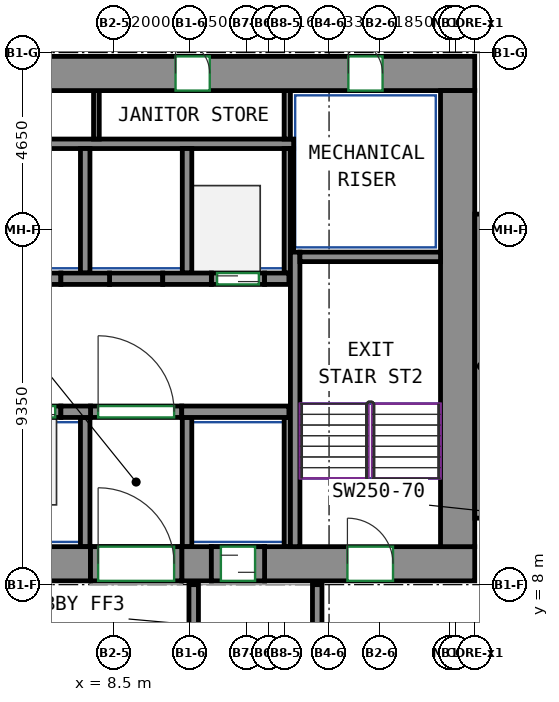
"""IFC4 building model, lengths in metres.
Left out: names, types, materials, properties, quantities, classifications, styles, units other than length and angle.
Written with IfcOpenShell. Run it as: python <this file> out.ifc"""

import sys

from ifc_helpers import new_model, si_unit, direction, frame, frame_2d, origin, place, context, subcontext, project, spatial, rectangle, extrude, source, transform, mapped, element, fill, save


model = new_model("IFC4")
c1 = context("Model", 3, precision=1e-05, world=origin(), true_north=direction((0.0, 1.0)))
c2 = subcontext(c1, "Body", "Model", "MODEL_VIEW")
j1 = project(units=[si_unit("LENGTHUNIT", "METRE"), si_unit("PLANEANGLEUNIT", "RADIAN")], contexts=[c1])
p1 = place(None, origin())
s1 = spatial("IfcSite", under=j1, at=p1, CompositionType="ELEMENT")
p2 = place(p1, origin())
s2 = spatial("IfcBuilding", under=s1, at=p2, CompositionType="ELEMENT")
p3 = place(p2, frame((0.0, 0.0, 138.5)))
s3 = spatial("IfcBuildingStorey", under=s2, at=p3, CompositionType="ELEMENT", Elevation=138.5)
m1 = source(origin(), c2, "Body", "SweptSolid", [
    extrude(rectangle(XDim=14.18, YDim=0.9, at=frame_2d((7.09, 0.0))), origin(), (0.0, 0.0, 1.0), 5.12),
])
p4 = place(p3, frame((-6.29, 8.55, 0.0), z_axis=(0.0, 0.0, 1.0), x_axis=(1.0, 0.0, 0.0)))
e1 = element("IfcWall", 1, at=p4, inside=s3, PredefinedType="SHEAR", context=c2, shape_type="MappedRepresentation", body=[
    mapped(m1, transform((0.0, 0.0, 0.0))),
])
m2 = source(origin(), c2, "Body", "SweptSolid", [
    extrude(rectangle(XDim=0.78, YDim=0.9, at=frame_2d((0.39, 0.0))), origin(), (0.0, 0.0, 1.0), 5.12),
])
p5 = place(p3, frame((10.29, 8.55, 0.0), z_axis=(0.0, 0.0, 1.0), x_axis=(1.0, 0.0, 0.0)))
e2 = element("IfcWall", 2, at=p5, inside=s3, PredefinedType="SHEAR", context=c2, shape_type="MappedRepresentation", body=[
    mapped(m2, transform((0.0, 0.0, 0.0))),
])
m3 = source(origin(), c2, "Body", "SweptSolid", [
    extrude(rectangle(XDim=5.53, YDim=0.9, at=frame_2d((2.765, 0.0))), origin(), (0.0, 0.0, 1.0), 5.12),
])
p6 = place(p3, frame((12.47, 8.55, 0.0), z_axis=(0.0, 0.0, 1.0), x_axis=(1.0, 0.0, 0.0)))
e3 = element("IfcWall", 3, at=p6, inside=s3, PredefinedType="SHEAR", context=c2, shape_type="MappedRepresentation", body=[
    mapped(m3, transform((0.0, 0.0, 0.0))),
])
p7 = place(p6, frame((2.18, 0.0, 0.0)))
e4 = element("IfcOpeningElement", 4, at=p7, cuts=e3, PredefinedType="OPENING", context=c2, shape_type="SweptSolid", body=[
    extrude(rectangle(XDim=1.2, YDim=2.1, at=frame_2d((0.6, 1.05))), frame((0.0, 0.46, 0.0), z_axis=(0.0, -1.0, 0.0), x_axis=(1.0, 0.0, 0.0)), (0.0, 0.0, 1.0), 0.92),
])
m4 = source(origin(), c2, "Body", "SweptSolid", [
    extrude(rectangle(XDim=33.9, YDim=0.9, at=frame_2d((16.95, 0.0))), origin(), (0.0, 0.0, 1.0), 5.12),
])
p8 = place(p3, frame((-15.9, 21.45, 0.0), z_axis=(0.0, 0.0, 1.0), x_axis=(1.0, 0.0, 0.0)))
e5 = element("IfcWall", 5, at=p8, inside=s3, PredefinedType="SHEAR", context=c2, shape_type="MappedRepresentation", body=[
    mapped(m4, transform((0.0, 0.0, 0.0))),
])
p9 = place(p8, frame((7.12, 0.0, 0.0)))
e6 = element("IfcOpeningElement", 6, at=p9, cuts=e5, PredefinedType="OPENING", context=c2, shape_type="SweptSolid", body=[
    extrude(rectangle(XDim=0.9, YDim=2.1, at=frame_2d((0.45, 1.05))), frame((0.0, 0.46, 0.0), z_axis=(0.0, -1.0, 0.0), x_axis=(1.0, 0.0, 0.0)), (0.0, 0.0, 1.0), 0.92),
])
p10 = place(p8, frame((12.427, 0.0, 0.0)))
e7 = element("IfcOpeningElement", 7, at=p10, cuts=e5, PredefinedType="OPENING", context=c2, shape_type="SweptSolid", body=[
    extrude(rectangle(XDim=0.9, YDim=2.1, at=frame_2d((0.45, 1.05))), frame((0.0, 0.46, 0.0), z_axis=(0.0, -1.0, 0.0), x_axis=(1.0, 0.0, 0.0)), (0.0, 0.0, 1.0), 0.92),
])
p11 = place(p8, frame((17.465, 0.0, 0.0)))
e8 = element("IfcOpeningElement", 8, at=p11, cuts=e5, PredefinedType="OPENING", context=c2, shape_type="SweptSolid", body=[
    extrude(rectangle(XDim=0.9, YDim=2.1, at=frame_2d((0.45, 1.05))), frame((0.0, 0.46, 0.0), z_axis=(0.0, -1.0, 0.0), x_axis=(1.0, 0.0, 0.0)), (0.0, 0.0, 1.0), 0.92),
])
p12 = place(p8, frame((21.686, 0.0, 0.0)))
e9 = element("IfcOpeningElement", 9, at=p12, cuts=e5, PredefinedType="OPENING", context=c2, shape_type="SweptSolid", body=[
    extrude(rectangle(XDim=0.9, YDim=2.1, at=frame_2d((0.45, 1.05))), frame((0.0, 0.46, 0.0), z_axis=(0.0, -1.0, 0.0), x_axis=(1.0, 0.0, 0.0)), (0.0, 0.0, 1.0), 0.92),
])
p13 = place(p8, frame((26.027, 0.0, 0.0)))
e10 = element("IfcOpeningElement", 10, at=p13, cuts=e5, PredefinedType="OPENING", context=c2, shape_type="SweptSolid", body=[
    extrude(rectangle(XDim=0.9, YDim=2.1, at=frame_2d((0.45, 1.05))), frame((0.0, 0.46, 0.0), z_axis=(0.0, -1.0, 0.0), x_axis=(1.0, 0.0, 0.0)), (0.0, 0.0, 1.0), 0.92),
])
p14 = place(p8, frame((2.425, 0.0, 0.0)))
e11 = element("IfcOpeningElement", 11, at=p14, cuts=e5, PredefinedType="OPENING", context=c2, shape_type="SweptSolid", body=[
    extrude(rectangle(XDim=0.9, YDim=2.1, at=frame_2d((0.45, 1.05))), frame((0.0, 0.46, 0.0), z_axis=(0.0, -1.0, 0.0), x_axis=(1.0, 0.0, 0.0)), (0.0, 0.0, 1.0), 0.92),
])
p15 = place(p8, frame((30.575, 0.0, 0.0)))
e12 = element("IfcOpeningElement", 12, at=p15, cuts=e5, PredefinedType="OPENING", context=c2, shape_type="SweptSolid", body=[
    extrude(rectangle(XDim=0.9, YDim=2.1, at=frame_2d((0.45, 1.05))), frame((0.0, 0.46, 0.0), z_axis=(0.0, -1.0, 0.0), x_axis=(1.0, 0.0, 0.0)), (0.0, 0.0, 1.0), 0.92),
])
m5 = source(origin(), c2, "Body", "SweptSolid", [
    extrude(rectangle(XDim=12.0, YDim=0.9, at=frame_2d((6.0, 0.0))), origin(), (0.0, 0.0, 1.0), 5.12),
])
p16 = place(p3, frame((17.55, 9.0, 0.0), z_axis=(0.0, 0.0, 1.0), x_axis=(0.0, 1.0, 0.0)))
e13 = element("IfcWall", 13, at=p16, inside=s3, PredefinedType="SHEAR", context=c2, shape_type="MappedRepresentation", body=[
    mapped(m5, transform((0.0, 0.0, 0.0))),
])
m6 = source(origin(), c2, "Body", "SweptSolid", [
    extrude(rectangle(XDim=7.75, YDim=0.25, at=frame_2d((3.875, 0.0))), origin(), (0.0, 0.0, 1.0), 5.12),
])
p17 = place(p3, frame((13.275, 9.0, 0.0), z_axis=(0.0, 0.0, 1.0), x_axis=(0.0, 1.0, 0.0)))
e14 = element("IfcWall", 14, at=p17, inside=s3, PredefinedType="SHEAR", context=c2, shape_type="MappedRepresentation", body=[
    mapped(m6, transform((0.0, 0.0, 0.0))),
])
m7 = source(origin(), c2, "Body", "SweptSolid", [
    extrude(rectangle(XDim=3.7, YDim=0.25, at=frame_2d((1.85, 0.0))), origin(), (0.0, 0.0, 1.0), 5.12),
])
p18 = place(p3, frame((13.4, 16.625, 0.0), z_axis=(0.0, 0.0, 1.0), x_axis=(1.0, 0.0, 0.0)))
e15 = element("IfcWall", 15, at=p18, inside=s3, PredefinedType="SHEAR", context=c2, shape_type="MappedRepresentation", body=[
    mapped(m7, transform((0.0, 0.0, 0.0))),
])
m8 = source(origin(), c2, "Body", "SweptSolid", [
    extrude(rectangle(XDim=8.0, YDim=0.35, at=frame_2d((4.0, 0.0))), origin(), (0.0, 0.0, 1.0), 5.12),
])
p19 = place(p3, frame((18.175, 9.75, 0.0), z_axis=(0.0, 0.0, 1.0), x_axis=(0.0, 1.0, 0.0)))
e16 = element("IfcWall", 16, at=p19, inside=s3, PredefinedType="SHEAR", context=c2, shape_type="MappedRepresentation", body=[
    mapped(m8, transform((0.0, 0.0, 0.0))),
])
m9 = source(origin(), c2, "Body", "SweptSolid", [
    extrude(rectangle(XDim=0.78, YDim=0.3, at=frame_2d((0.39, 0.0))), origin(), (0.0, 0.0, 1.0), 5.12),
])
p20 = place(p3, frame((7.11, 12.55, 0.0), z_axis=(0.0, 0.0, 1.0), x_axis=(1.0, 0.0, 0.0)))
e17 = element("IfcWall", 17, at=p20, inside=s3, PredefinedType="SHEAR", context=c2, shape_type="MappedRepresentation", body=[
    mapped(m9, transform((0.0, 0.0, 0.0))),
])
m10 = source(origin(), c2, "Body", "SweptSolid", [
    extrude(rectangle(XDim=2.82, YDim=0.3, at=frame_2d((1.41, 0.0))), origin(), (0.0, 0.0, 1.0), 5.12),
])
p21 = place(p3, frame((10.29, 12.55, 0.0), z_axis=(0.0, 0.0, 1.0), x_axis=(1.0, 0.0, 0.0)))
e18 = element("IfcWall", 18, at=p21, inside=s3, PredefinedType="SHEAR", context=c2, shape_type="MappedRepresentation", body=[
    mapped(m10, transform((0.0, 0.0, 0.0))),
])
m11 = source(origin(), c2, "Body", "SweptSolid", [
    extrude(rectangle(XDim=1.28, YDim=0.3, at=frame_2d((0.64, 0.0))), origin(), (0.0, 0.0, 1.0), 5.12),
])
p22 = place(p3, frame((7.11, 16.05, 0.0), z_axis=(0.0, 0.0, 1.0), x_axis=(1.0, 0.0, 0.0)))
e19 = element("IfcWall", 19, at=p22, inside=s3, PredefinedType="SHEAR", context=c2, shape_type="MappedRepresentation", body=[
    mapped(m11, transform((0.0, 0.0, 0.0))),
])
m12 = source(origin(), c2, "Body", "SweptSolid", [
    extrude(rectangle(XDim=1.28, YDim=0.3, at=frame_2d((0.64, 0.0))), origin(), (0.0, 0.0, 1.0), 5.12),
])
p23 = place(p3, frame((9.79, 16.05, 0.0), z_axis=(0.0, 0.0, 1.0), x_axis=(1.0, 0.0, 0.0)))
e20 = element("IfcWall", 20, at=p23, inside=s3, PredefinedType="SHEAR", context=c2, shape_type="MappedRepresentation", body=[
    mapped(m12, transform((0.0, 0.0, 0.0))),
])
m13 = source(origin(), c2, "Body", "SweptSolid", [
    extrude(rectangle(XDim=0.64, YDim=0.3, at=frame_2d((0.32, 0.0))), origin(), (0.0, 0.0, 1.0), 5.12),
])
p24 = place(p3, frame((12.47, 16.05, 0.0), z_axis=(0.0, 0.0, 1.0), x_axis=(1.0, 0.0, 0.0)))
e21 = element("IfcWall", 21, at=p24, inside=s3, PredefinedType="SHEAR", context=c2, shape_type="MappedRepresentation", body=[
    mapped(m13, transform((0.0, 0.0, 0.0))),
])
m14 = source(origin(), c2, "Body", "SweptSolid", [
    extrude(rectangle(XDim=2.4, YDim=0.9, at=frame_2d((1.2, 0.0))), origin(), (0.0, 0.0, 1.0), 0.92),
])
p25 = place(p3, frame((7.89, 8.55, 4.2), z_axis=(0.0, 0.0, 1.0), x_axis=(1.0, 0.0, 0.0)))
e22 = element("IfcWall", 22, at=p25, inside=s3, PredefinedType="SHEAR", context=c2, shape_type="MappedRepresentation", body=[
    mapped(m14, transform((0.0, 0.0, 0.0))),
])
m15 = source(origin(), c2, "Body", "SweptSolid", [
    extrude(rectangle(XDim=1.4, YDim=0.9, at=frame_2d((0.7, 0.0))), origin(), (0.0, 0.0, 1.0), 1.17),
])
p26 = place(p3, frame((11.07, 8.55, 3.95), z_axis=(0.0, 0.0, 1.0), x_axis=(1.0, 0.0, 0.0)))
e23 = element("IfcWall", 23, at=p26, inside=s3, PredefinedType="SHEAR", context=c2, shape_type="MappedRepresentation", body=[
    mapped(m15, transform((0.0, 0.0, 0.0))),
])
m16 = source(origin(), c2, "Body", "SweptSolid", [
    extrude(rectangle(XDim=1.4, YDim=0.3, at=frame_2d((0.7, 0.0))), origin(), (0.0, 0.0, 1.0), 5.12),
])
p27 = place(p3, frame((5.71, 12.55, 0.0), z_axis=(0.0, 0.0, 1.0), x_axis=(1.0, 0.0, 0.0)))
e24 = element("IfcWall", 24, at=p27, inside=s3, PredefinedType="PARTITIONING", context=c2, shape_type="MappedRepresentation", body=[
    mapped(m16, transform((0.0, 0.0, 0.0))),
])
p28 = place(p27, frame((0.15, 0.0, 0.0)))
e25 = element("IfcOpeningElement", 25, at=p28, cuts=e24, PredefinedType="OPENING", context=c2, shape_type="SweptSolid", body=[
    extrude(rectangle(XDim=1.1, YDim=2.1, at=frame_2d((0.55, 1.05))), frame((0.0, 0.16, 0.0), z_axis=(0.0, -1.0, 0.0), x_axis=(1.0, 0.0, 0.0)), (0.0, 0.0, 1.0), 0.32),
])
m17 = source(origin(), c2, "Body", "SweptSolid", [
    extrude(rectangle(XDim=1.4, YDim=0.3, at=frame_2d((0.7, 0.0))), origin(), (0.0, 0.0, 1.0), 5.12),
])
p29 = place(p3, frame((11.07, 16.05, 0.0), z_axis=(0.0, 0.0, 1.0), x_axis=(1.0, 0.0, 0.0)))
e26 = element("IfcWall", 26, at=p29, inside=s3, PredefinedType="PARTITIONING", context=c2, shape_type="MappedRepresentation", body=[
    mapped(m17, transform((0.0, 0.0, 0.0))),
])
p30 = place(p29, frame((0.15, 0.0, 0.0)))
e27 = element("IfcOpeningElement", 27, at=p30, cuts=e26, PredefinedType="OPENING", context=c2, shape_type="SweptSolid", body=[
    extrude(rectangle(XDim=1.1, YDim=2.1, at=frame_2d((0.55, 1.05))), frame((0.0, 0.16, 0.0), z_axis=(0.0, -1.0, 0.0), x_axis=(1.0, 0.0, 0.0)), (0.0, 0.0, 1.0), 0.32),
])
m18 = source(origin(), c2, "Body", "SweptSolid", [
    extrude(rectangle(XDim=2.4, YDim=0.3, at=frame_2d((1.2, 0.0))), origin(), (0.0, 0.0, 1.0), 5.12),
])
p31 = place(p3, frame((7.89, 12.55, 0.0), z_axis=(0.0, 0.0, 1.0), x_axis=(1.0, 0.0, 0.0)))
e28 = element("IfcWall", 28, at=p31, inside=s3, PredefinedType="PARTITIONING", context=c2, shape_type="MappedRepresentation", body=[
    mapped(m18, transform((0.0, 0.0, 0.0))),
])
p32 = place(p31, frame((0.2, 0.0, 0.0)))
e29 = element("IfcOpeningElement", 29, at=p32, cuts=e28, PredefinedType="OPENING", context=c2, shape_type="SweptSolid", body=[
    extrude(rectangle(XDim=2.0, YDim=2.1, at=frame_2d((1.0, 1.05))), frame((0.0, 0.16, 0.0), z_axis=(0.0, -1.0, 0.0), x_axis=(1.0, 0.0, 0.0)), (0.0, 0.0, 1.0), 0.32),
])
for number, where, z_axis, x_axis in (
    (30, (5.71, 16.05, 0.0), (0.0, 0.0, 1.0), (1.0, 0.0, 0.0)),
    (31, (8.39, 16.05, 0.0), (0.0, 0.0, 1.0), (1.0, 0.0, 0.0)),
):
    element("IfcWall", number, at=place(p3, frame(where, z_axis=z_axis, x_axis=x_axis)), inside=s3, PredefinedType="PARTITIONING", context=c2, shape_type="MappedRepresentation", body=[
        mapped(m16, transform((0.0, 0.0, 0.0))),
    ])
m19 = source(origin(), c2, "Body", "SweptSolid", [
    extrude(rectangle(XDim=2.65, YDim=0.25, at=frame_2d((1.325, 0.0))), origin(), (0.0, 0.0, 1.0), 5.12),
])
for number, where, z_axis, x_axis in (
    (32, (10.605, 5.35, 0.0), (0.0, 0.0, 1.0), (0.0, 1.0, 0.0)),
    (33, (13.855, 5.35, 0.0), (0.0, 0.0, 1.0), (0.0, 1.0, 0.0)),
):
    element("IfcWall", number, at=place(p3, frame(where, z_axis=z_axis, x_axis=x_axis)), inside=s3, PredefinedType="PARTITIONING", context=c2, shape_type="MappedRepresentation", body=[
        mapped(m19, transform((0.0, 0.0, 0.0))),
    ])
m20 = source(origin(), c2, "Body", "SweptSolid", [
    extrude(rectangle(XDim=19.01, YDim=0.25, at=frame_2d((9.505, 0.0))), origin(), (0.0, 0.0, 1.0), 5.12),
])
p33 = place(p3, frame((-5.775, 19.6, 0.0), z_axis=(0.0, 0.0, 1.0), x_axis=(1.0, 0.0, 0.0)))
e34 = element("IfcWall", 34, at=p33, inside=s3, PredefinedType="PARTITIONING", context=c2, shape_type="MappedRepresentation", body=[
    mapped(m20, transform((0.0, 0.0, 0.0))),
])
m21 = source(origin(), c2, "Body", "SweptSolid", [
    extrude(rectangle(XDim=3.275, YDim=0.165, at=frame_2d((1.638, 0.0))), origin(), (0.0, 0.0, 1.0), 5.12),
])
p34 = place(p3, frame((13.067, 16.2, 0.0), z_axis=(0.0, 0.0, 1.0), x_axis=(0.0, 1.0, 0.0)))
e35 = element("IfcWall", 35, at=p34, inside=s3, PredefinedType="PARTITIONING", context=c2, shape_type="MappedRepresentation", body=[
    mapped(m21, transform((0.0, 0.0, 0.0))),
])
m22 = source(origin(), c2, "Body", "SweptSolid", [
    extrude(rectangle(XDim=1.275, YDim=0.165, at=frame_2d((0.637, 0.0))), origin(), (0.0, 0.0, 1.0), 5.12),
])
p35 = place(p3, frame((13.067, 19.725, 0.0), z_axis=(0.0, 0.0, 1.0), x_axis=(0.0, 1.0, 0.0)))
e36 = element("IfcWall", 36, at=p35, inside=s3, PredefinedType="PARTITIONING", context=c2, shape_type="MappedRepresentation", body=[
    mapped(m22, transform((0.0, 0.0, 0.0))),
])
m23 = source(origin(), c2, "Body", "SweptSolid", [
    extrude(rectangle(XDim=3.275, YDim=0.25, at=frame_2d((1.638, 0.0))), origin(), (0.0, 0.0, 1.0), 5.12),
])
p36 = place(p3, frame((10.43, 16.2, 0.0), z_axis=(0.0, 0.0, 1.0), x_axis=(0.0, 1.0, 0.0)))
e37 = element("IfcWall", 37, at=p36, inside=s3, PredefinedType="PARTITIONING", context=c2, shape_type="MappedRepresentation", body=[
    mapped(m23, transform((0.0, 0.0, 0.0))),
])
m24 = source(origin(), c2, "Body", "SweptSolid", [
    extrude(rectangle(XDim=2.725, YDim=0.085, at=frame_2d((1.363, 0.0))), origin(), (0.0, 0.0, 1.0), 5.12),
])
p37 = place(p3, frame((13.192, 16.75, 0.0), z_axis=(0.0, 0.0, 1.0), x_axis=(0.0, 1.0, 0.0)))
e38 = element("IfcWall", 38, at=p37, inside=s3, PredefinedType="PARTITIONING", context=c2, shape_type="MappedRepresentation", body=[
    mapped(m24, transform((0.0, 0.0, 0.0))),
])
p38 = place(p3, frame((7.75, 16.2, 0.0), z_axis=(0.0, 0.0, 1.0), x_axis=(0.0, 1.0, 0.0)))
e39 = element("IfcWall", 39, at=p38, inside=s3, PredefinedType="PARTITIONING", context=c2, shape_type="MappedRepresentation", body=[
    mapped(m23, transform((0.0, 0.0, 0.0))),
])
m25 = source(origin(), c2, "Body", "SweptSolid", [
    extrude(rectangle(XDim=3.4, YDim=0.25, at=frame_2d((1.7, 0.0))), origin(), (0.0, 0.0, 1.0), 5.12),
])
p39 = place(p3, frame((10.43, 9.0, 0.0), z_axis=(0.0, 0.0, 1.0), x_axis=(0.0, 1.0, 0.0)))
e40 = element("IfcWall", 40, at=p39, inside=s3, PredefinedType="PARTITIONING", context=c2, shape_type="MappedRepresentation", body=[
    mapped(m25, transform((0.0, 0.0, 0.0))),
])
m26 = source(origin(), c2, "Body", "SweptSolid", [
    extrude(rectangle(XDim=3.4, YDim=0.165, at=frame_2d((1.7, 0.0))), origin(), (0.0, 0.0, 1.0), 5.12),
])
p40 = place(p3, frame((13.067, 9.0, 0.0), z_axis=(0.0, 0.0, 1.0), x_axis=(0.0, 1.0, 0.0)))
e41 = element("IfcWall", 41, at=p40, inside=s3, PredefinedType="PARTITIONING", context=c2, shape_type="MappedRepresentation", body=[
    mapped(m26, transform((0.0, 0.0, 0.0))),
])
p41 = place(p3, frame((7.75, 9.0, 0.0), z_axis=(0.0, 0.0, 1.0), x_axis=(0.0, 1.0, 0.0)))
e42 = element("IfcWall", 42, at=p41, inside=s3, PredefinedType="PARTITIONING", context=c2, shape_type="MappedRepresentation", body=[
    mapped(m25, transform((0.0, 0.0, 0.0))),
])
m27 = source(origin(), c2, "Body", "SweptSolid", [
    extrude(rectangle(XDim=1.275, YDim=0.15, at=frame_2d((0.637, 0.0))), origin(), (0.0, 0.0, 1.0), 5.12),
])
p42 = place(p3, frame((8.045, 19.725, 0.0), z_axis=(0.0, 0.0, 1.0), x_axis=(0.0, 1.0, 0.0)))
e43 = element("IfcWall", 43, at=p42, inside=s3, PredefinedType="PARTITIONING", context=c2, shape_type="MappedRepresentation", body=[
    mapped(m27, transform((0.0, 0.0, 0.0))),
])
m28 = source(origin(), c2, "Body", "SweptSolid", [
    extrude(rectangle(XDim=2.4, YDim=0.9, at=frame_2d((1.2, 0.0))), origin(), (0.0, 0.0, 1.0), 2.7),
])
p43 = place(p3, frame((7.89, 8.55, 0.0), z_axis=(0.0, 0.0, 1.0), x_axis=(1.0, 0.0, 0.0)))
e44 = element("IfcWall", 44, at=p43, inside=s3, PredefinedType="PARTITIONING", context=c2, shape_type="MappedRepresentation", body=[
    mapped(m28, transform((0.0, 0.0, 0.0))),
])
p44 = place(p43, frame((0.2, 0.0, 0.0)))
e45 = element("IfcOpeningElement", 45, at=p44, cuts=e44, PredefinedType="OPENING", context=c2, shape_type="SweptSolid", body=[
    extrude(rectangle(XDim=2.0, YDim=2.1, at=frame_2d((1.0, 1.05))), frame((0.0, 0.46, 0.0), z_axis=(0.0, -1.0, 0.0), x_axis=(1.0, 0.0, 0.0)), (0.0, 0.0, 1.0), 0.92),
])
m29 = source(origin(), c2, "Body", "SweptSolid", [
    extrude(rectangle(XDim=1.4, YDim=0.9, at=frame_2d((0.7, 0.0))), origin(), (0.0, 0.0, 1.0), 2.7),
])
p45 = place(p3, frame((11.07, 8.55, 0.0), z_axis=(0.0, 0.0, 1.0), x_axis=(1.0, 0.0, 0.0)))
e46 = element("IfcWall", 46, at=p45, inside=s3, PredefinedType="PARTITIONING", context=c2, shape_type="MappedRepresentation", body=[
    mapped(m29, transform((0.0, 0.0, 0.0))),
])
p46 = place(p45, frame((0.25, 0.0, 0.0)))
e47 = element("IfcOpeningElement", 47, at=p46, cuts=e46, PredefinedType="OPENING", context=c2, shape_type="SweptSolid", body=[
    extrude(rectangle(XDim=0.9, YDim=2.1, at=frame_2d((0.45, 1.05))), frame((0.0, 0.46, 0.0), z_axis=(0.0, -1.0, 0.0), x_axis=(1.0, 0.0, 0.0)), (0.0, 0.0, 1.0), 0.92),
])
p47 = place(p32, origin())
e48 = element("IfcDoor", 48, at=p47, inside=s3, OperationType="DOUBLE_DOOR_SINGLE_SWING", PredefinedType="DOOR", context=c2, shape_type="SweptSolid", body=[
    extrude(rectangle(XDim=2.0, YDim=2.1, at=frame_2d((1.0, 1.05))), frame((0.0, 0.025, 0.0), z_axis=(0.0, -1.0, 0.0), x_axis=(1.0, 0.0, 0.0)), (0.0, 0.0, 1.0), 0.05),
])
fill(e29, e48)
p48 = place(p44, origin())
e49 = element("IfcDoor", 49, at=p48, inside=s3, OperationType="DOUBLE_DOOR_SINGLE_SWING", PredefinedType="DOOR", context=c2, shape_type="SweptSolid", body=[
    extrude(rectangle(XDim=2.0, YDim=2.1, at=frame_2d((1.0, 1.05))), frame((0.0, 0.355, 0.0), z_axis=(0.0, -1.0, 0.0), x_axis=(1.0, 0.0, 0.0)), (0.0, 0.0, 1.0), 0.05),
])
fill(e45, e49)
p49 = place(p46, origin())
e50 = element("IfcDoor", 50, at=p49, inside=s3, OperationType="SLIDING_TO_LEFT", PredefinedType="DOOR", context=c2, shape_type="SweptSolid", body=[
    extrude(rectangle(XDim=0.9, YDim=2.1, at=frame_2d((0.45, 1.05))), frame((0.0, 0.355, 0.0), z_axis=(0.0, -1.0, 0.0), x_axis=(1.0, 0.0, 0.0)), (0.0, 0.0, 1.0), 0.05),
])
fill(e47, e50)
p50 = place(p28, origin())
e51 = element("IfcDoor", 51, at=p50, inside=s3, OperationType="DOUBLE_DOOR_SLIDING", PredefinedType="DOOR", context=c2, shape_type="SweptSolid", body=[
    extrude(rectangle(XDim=1.1, YDim=2.1, at=frame_2d((0.55, 1.05))), frame((0.0, 0.025, 0.0), z_axis=(0.0, -1.0, 0.0), x_axis=(1.0, 0.0, 0.0)), (0.0, 0.0, 1.0), 0.05),
])
fill(e25, e51)
p51 = place(p30, origin())
e52 = element("IfcDoor", 52, at=p51, inside=s3, OperationType="DOUBLE_DOOR_SLIDING", PredefinedType="DOOR", context=c2, shape_type="SweptSolid", body=[
    extrude(rectangle(XDim=1.1, YDim=2.1, at=frame_2d((0.55, 1.05))), frame((0.0, 0.025, 0.0), z_axis=(0.0, -1.0, 0.0), x_axis=(1.0, 0.0, 0.0)), (0.0, 0.0, 1.0), 0.05),
])
fill(e27, e52)
p52 = place(p13, origin())
e53 = element("IfcDoor", 53, at=p52, inside=s3, OperationType="SINGLE_SWING_LEFT", PredefinedType="DOOR", context=c2, shape_type="SweptSolid", body=[
    extrude(rectangle(XDim=0.9, YDim=2.1, at=frame_2d((0.45, 1.05))), frame((0.0, -0.305, 0.0), z_axis=(0.0, -1.0, 0.0), x_axis=(1.0, 0.0, 0.0)), (0.0, 0.0, 1.0), 0.05),
])
fill(e10, e53)
p53 = place(p15, origin())
e54 = element("IfcDoor", 54, at=p53, inside=s3, OperationType="SINGLE_SWING_LEFT", PredefinedType="DOOR", context=c2, shape_type="SweptSolid", body=[
    extrude(rectangle(XDim=0.9, YDim=2.1, at=frame_2d((0.45, 1.05))), frame((0.0, -0.305, 0.0), z_axis=(0.0, -1.0, 0.0), x_axis=(1.0, 0.0, 0.0)), (0.0, 0.0, 1.0), 0.05),
])
fill(e12, e54)
p54 = place(p7, origin())
e55 = element("IfcDoor", 55, at=p54, inside=s3, OperationType="DOUBLE_DOOR_SINGLE_SWING", PredefinedType="DOOR", context=c2, shape_type="SweptSolid", body=[
    extrude(rectangle(XDim=1.2, YDim=2.1, at=frame_2d((0.6, 1.05))), frame((0.0, 0.355, 0.0), z_axis=(0.0, -1.0, 0.0), x_axis=(1.0, 0.0, 0.0)), (0.0, 0.0, 1.0), 0.05),
])
fill(e4, e55)
save(model, sys.argv[1])
